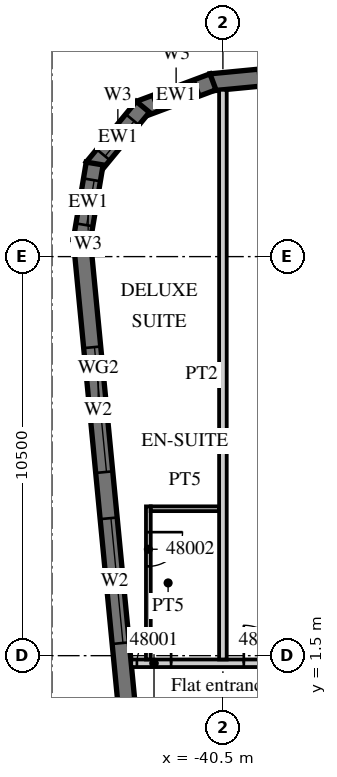
"""IFC4 building model, lengths in metres.
Left out: names, types, materials, properties, quantities, classifications, styles, units other than length and angle.
Written with IfcOpenShell. Run it as: python <this file> out.ifc"""

import sys

from ifc_helpers import new_model, si_unit, direction, frame, frame_2d, origin, place, context, subcontext, project, spatial, polyline, rectangle, outline, extrude, element, fill, save


model = new_model("IFC4")
c1 = context("Model", 3, precision=1e-05, world=origin(), true_north=direction((0.0, 1.0)))
c2 = subcontext(c1, "Body", "Model", "MODEL_VIEW")
j1 = project(units=[si_unit("LENGTHUNIT", "METRE"), si_unit("PLANEANGLEUNIT", "RADIAN")], contexts=[c1])
p1 = place(None, origin())
s1 = spatial("IfcSite", under=j1, at=p1, CompositionType="ELEMENT")
p2 = place(p1, origin())
s2 = spatial("IfcBuilding", under=s1, at=p2, CompositionType="ELEMENT")
p3 = place(p2, frame((0.0, 0.0, 199.9)))
s3 = spatial("IfcBuildingStorey", under=s2, at=p3, CompositionType="ELEMENT", Elevation=199.9)
p4 = place(p3, frame((-44.214, 12.466, 0.0), z_axis=(0.0, 0.0, 1.0), x_axis=(0.095847314626, -0.995396047952, 0.0)))
e1 = element("IfcWall", 1, at=p4, inside=s3, PredefinedType="SOLIDWALL", context=c2, shape_type="SweptSolid", body=[
    extrude(rectangle(XDim=34.0, YDim=0.45, at=frame_2d((17.0, 0.0))), origin(), (0.0, 0.0, 1.0), 3.02),
])
p5 = place(p4, frame((2.865, 0.0, 0.45)))
e2 = element("IfcOpeningElement", 2, at=p5, cuts=e1, PredefinedType="OPENING", context=c2, shape_type="SweptSolid", body=[
    extrude(rectangle(XDim=3.3, YDim=2.25, at=frame_2d((1.65, 1.125))), frame((0.0, 0.235, 0.0), z_axis=(0.0, -1.0, 0.0), x_axis=(1.0, 0.0, 0.0)), (0.0, 0.0, 1.0), 0.47),
])
p6 = place(p4, frame((7.386, 0.0, 0.45)))
e3 = element("IfcOpeningElement", 3, at=p6, cuts=e1, PredefinedType="OPENING", context=c2, shape_type="SweptSolid", body=[
    extrude(rectangle(XDim=3.3, YDim=2.25, at=frame_2d((1.65, 1.125))), frame((0.0, 0.235, 0.0), z_axis=(0.0, -1.0, 0.0), x_axis=(1.0, 0.0, 0.0)), (0.0, 0.0, 1.0), 0.47),
])
p7 = place(p3, frame((13.521, 21.817, 0.0), z_axis=(0.0, 0.0, 1.0), x_axis=(-0.995396508751, -0.095842529008, 0.0)))
e4 = element("IfcWall", 4, at=p7, inside=s3, PredefinedType="SOLIDWALL", context=c2, shape_type="SweptSolid", body=[
    extrude(rectangle(XDim=54.591, YDim=0.45, at=frame_2d((27.296, 0.0))), origin(), (0.0, 0.0, 1.0), 3.02),
])
p8 = place(p7, frame((0.91, 0.0, 0.45)))
e5 = element("IfcOpeningElement", 5, at=p8, cuts=e4, PredefinedType="OPENING", context=c2, shape_type="SweptSolid", body=[
    extrude(rectangle(XDim=2.7, YDim=2.25, at=frame_2d((1.35, 1.125))), frame((0.0, 0.235, 0.0), z_axis=(0.0, -1.0, 0.0), x_axis=(1.0, 0.0, 0.0)), (0.0, 0.0, 1.0), 0.47),
])
p9 = place(p7, frame((5.431, 0.0, 0.45)))
e6 = element("IfcOpeningElement", 6, at=p9, cuts=e4, PredefinedType="OPENING", context=c2, shape_type="SweptSolid", body=[
    extrude(rectangle(XDim=2.7, YDim=2.25, at=frame_2d((1.35, 1.125))), frame((0.0, 0.235, 0.0), z_axis=(0.0, -1.0, 0.0), x_axis=(1.0, 0.0, 0.0)), (0.0, 0.0, 1.0), 0.47),
])
p10 = place(p7, frame((9.952, 0.0, 0.45)))
e7 = element("IfcOpeningElement", 7, at=p10, cuts=e4, PredefinedType="OPENING", context=c2, shape_type="SweptSolid", body=[
    extrude(rectangle(XDim=2.7, YDim=2.25, at=frame_2d((1.35, 1.125))), frame((0.0, 0.235, 0.0), z_axis=(0.0, -1.0, 0.0), x_axis=(1.0, 0.0, 0.0)), (0.0, 0.0, 1.0), 0.47),
])
p11 = place(p7, frame((14.473, 0.0, 0.45)))
e8 = element("IfcOpeningElement", 8, at=p11, cuts=e4, PredefinedType="OPENING", context=c2, shape_type="SweptSolid", body=[
    extrude(rectangle(XDim=2.7, YDim=2.25, at=frame_2d((1.35, 1.125))), frame((0.0, 0.235, 0.0), z_axis=(0.0, -1.0, 0.0), x_axis=(1.0, 0.0, 0.0)), (0.0, 0.0, 1.0), 0.47),
])
p12 = place(p7, frame((18.994, 0.0, 0.45)))
e9 = element("IfcOpeningElement", 9, at=p12, cuts=e4, PredefinedType="OPENING", context=c2, shape_type="SweptSolid", body=[
    extrude(rectangle(XDim=2.7, YDim=2.25, at=frame_2d((1.35, 1.125))), frame((0.0, 0.235, 0.0), z_axis=(0.0, -1.0, 0.0), x_axis=(1.0, 0.0, 0.0)), (0.0, 0.0, 1.0), 0.47),
])
p13 = place(p7, frame((23.514, 0.0, 0.45)))
e10 = element("IfcOpeningElement", 10, at=p13, cuts=e4, PredefinedType="OPENING", context=c2, shape_type="SweptSolid", body=[
    extrude(rectangle(XDim=2.7, YDim=2.25, at=frame_2d((1.35, 1.125))), frame((0.0, 0.235, 0.0), z_axis=(0.0, -1.0, 0.0), x_axis=(1.0, 0.0, 0.0)), (0.0, 0.0, 1.0), 0.47),
])
p14 = place(p7, frame((28.035, 0.0, 0.45)))
e11 = element("IfcOpeningElement", 11, at=p14, cuts=e4, PredefinedType="OPENING", context=c2, shape_type="SweptSolid", body=[
    extrude(rectangle(XDim=2.7, YDim=2.25, at=frame_2d((1.35, 1.125))), frame((0.0, 0.235, 0.0), z_axis=(0.0, -1.0, 0.0), x_axis=(1.0, 0.0, 0.0)), (0.0, 0.0, 1.0), 0.47),
])
p15 = place(p7, frame((32.556, 0.0, 0.45)))
e12 = element("IfcOpeningElement", 12, at=p15, cuts=e4, PredefinedType="OPENING", context=c2, shape_type="SweptSolid", body=[
    extrude(rectangle(XDim=2.7, YDim=2.25, at=frame_2d((1.35, 1.125))), frame((0.0, 0.235, 0.0), z_axis=(0.0, -1.0, 0.0), x_axis=(1.0, 0.0, 0.0)), (0.0, 0.0, 1.0), 0.47),
])
p16 = place(p7, frame((37.077, 0.0, 0.45)))
e13 = element("IfcOpeningElement", 13, at=p16, cuts=e4, PredefinedType="OPENING", context=c2, shape_type="SweptSolid", body=[
    extrude(rectangle(XDim=2.7, YDim=2.25, at=frame_2d((1.35, 1.125))), frame((0.0, 0.235, 0.0), z_axis=(0.0, -1.0, 0.0), x_axis=(1.0, 0.0, 0.0)), (0.0, 0.0, 1.0), 0.47),
])
p17 = place(p7, frame((41.598, 0.0, 0.45)))
e14 = element("IfcOpeningElement", 14, at=p17, cuts=e4, PredefinedType="OPENING", context=c2, shape_type="SweptSolid", body=[
    extrude(rectangle(XDim=2.7, YDim=2.25, at=frame_2d((1.35, 1.125))), frame((0.0, 0.235, 0.0), z_axis=(0.0, -1.0, 0.0), x_axis=(1.0, 0.0, 0.0)), (0.0, 0.0, 1.0), 0.47),
])
p18 = place(p7, frame((46.118, 0.0, 0.45)))
e15 = element("IfcOpeningElement", 15, at=p18, cuts=e4, PredefinedType="OPENING", context=c2, shape_type="SweptSolid", body=[
    extrude(rectangle(XDim=2.7, YDim=2.25, at=frame_2d((1.35, 1.125))), frame((0.0, 0.235, 0.0), z_axis=(0.0, -1.0, 0.0), x_axis=(1.0, 0.0, 0.0)), (0.0, 0.0, 1.0), 0.47),
])
p19 = place(p7, frame((50.629, 0.0, 0.45)))
e16 = element("IfcOpeningElement", 16, at=p19, cuts=e4, PredefinedType="OPENING", context=c2, shape_type="SweptSolid", body=[
    extrude(rectangle(XDim=2.7, YDim=2.25, at=frame_2d((1.35, 1.125))), frame((0.0, 0.235, 0.0), z_axis=(0.0, -1.0, 0.0), x_axis=(1.0, 0.0, 0.0)), (0.0, 0.0, 1.0), 0.47),
])
p20 = place(p3, frame((-40.761, 16.598, 0.0), z_axis=(0.0, 0.0, 1.0), x_axis=(-0.936677599948, -0.350192909346, 0.0)))
e17 = element("IfcWall", 17, at=p20, inside=s3, PredefinedType="SOLIDWALL", context=c2, shape_type="SweptSolid", body=[
    extrude(outline(polyline([(0.0, -0.225), (2.071, -0.225), (1.95, 0.225), (0.121, 0.225), (0.0, -0.225)])), origin(), (0.0, 0.0, 1.0), 3.02),
])
p21 = place(p20, frame((0.435, 0.0, 0.45)))
e18 = element("IfcOpeningElement", 18, at=p21, cuts=e17, PredefinedType="OPENING", context=c2, shape_type="SweptSolid", body=[
    extrude(rectangle(XDim=1.2, YDim=2.25, at=frame_2d((0.6, 1.125))), frame((0.0, 0.235, 0.0), z_axis=(0.0, -1.0, 0.0), x_axis=(1.0, 0.0, 0.0)), (0.0, 0.0, 1.0), 0.47),
])
p22 = place(p3, frame((-42.606, 15.941, 0.0), z_axis=(0.0, 0.0, 1.0), x_axis=(-0.636116318187, -0.771593176315, 0.0)))
e19 = element("IfcWall", 19, at=p22, inside=s3, PredefinedType="SOLIDWALL", context=c2, shape_type="SweptSolid", body=[
    extrude(outline(polyline([(0.0, -0.225), (2.071, -0.225), (1.95, 0.225), (0.121, 0.225), (0.0, -0.225)])), origin(), (0.0, 0.0, 1.0), 3.02),
])
p23 = place(p22, frame((0.435, 0.0, 0.45)))
e20 = element("IfcOpeningElement", 20, at=p23, cuts=e19, PredefinedType="OPENING", context=c2, shape_type="SweptSolid", body=[
    extrude(rectangle(XDim=1.2, YDim=2.25, at=frame_2d((0.6, 1.125))), frame((0.0, 0.235, 0.0), z_axis=(0.0, -1.0, 0.0), x_axis=(1.0, 0.0, 0.0)), (0.0, 0.0, 1.0), 0.47),
])
p24 = place(p3, frame((-43.875, 14.449, 0.0), z_axis=(0.0, 0.0, 1.0), x_axis=(-0.164953448126, -0.986301353518, 0.0)))
e21 = element("IfcWall", 21, at=p24, inside=s3, PredefinedType="SOLIDWALL", context=c2, shape_type="SweptSolid", body=[
    extrude(outline(polyline([(0.0, -0.225), (2.071, -0.225), (1.95, 0.225), (0.121, 0.225), (0.0, -0.225)])), origin(), (0.0, 0.0, 1.0), 3.02),
])
p25 = place(p24, frame((0.435, 0.0, 0.45)))
e22 = element("IfcOpeningElement", 22, at=p25, cuts=e21, PredefinedType="OPENING", context=c2, shape_type="SweptSolid", body=[
    extrude(rectangle(XDim=1.2, YDim=2.25, at=frame_2d((0.6, 1.125))), frame((0.0, 0.235, 0.0), z_axis=(0.0, -1.0, 0.0), x_axis=(1.0, 0.0, 0.0)), (0.0, 0.0, 1.0), 0.47),
])
p26 = place(p3, frame((-42.913, 1.3, 0.0), z_axis=(0.0, 0.0, 1.0), x_axis=(1.0, 0.0, 0.0)))
e23 = element("IfcWall", 23, at=p26, inside=s3, PredefinedType="PARTITIONING", context=c2, shape_type="SweptSolid", body=[
    extrude(rectangle(XDim=29.413, YDim=0.2, at=frame_2d((14.707, 0.0))), origin(), (0.0, 0.0, 1.0), 3.02),
])
p27 = place(p26, frame((0.15, 0.0, 0.0)))
e24 = element("IfcOpeningElement", 24, at=p27, cuts=e23, PredefinedType="OPENING", context=c2, shape_type="SweptSolid", body=[
    extrude(rectangle(XDim=0.9, YDim=2.1, at=frame_2d((0.45, 1.05))), frame((0.0, 0.11, 0.0), z_axis=(0.0, -1.0, 0.0), x_axis=(1.0, 0.0, 0.0)), (0.0, 0.0, 1.0), 0.22),
])
p28 = place(p26, frame((2.963, 0.0, 0.0)))
e25 = element("IfcOpeningElement", 25, at=p28, cuts=e23, PredefinedType="OPENING", context=c2, shape_type="SweptSolid", body=[
    extrude(rectangle(XDim=1.0, YDim=2.1, at=frame_2d((0.5, 1.05))), frame((0.0, 0.11, 0.0), z_axis=(0.0, -1.0, 0.0), x_axis=(1.0, 0.0, 0.0)), (0.0, 0.0, 1.0), 0.22),
])
p29 = place(p26, frame((9.863, 0.0, 0.0)))
e26 = element("IfcOpeningElement", 26, at=p29, cuts=e23, PredefinedType="OPENING", context=c2, shape_type="SweptSolid", body=[
    extrude(rectangle(XDim=1.0, YDim=2.1, at=frame_2d((0.5, 1.05))), frame((0.0, 0.11, 0.0), z_axis=(0.0, -1.0, 0.0), x_axis=(1.0, 0.0, 0.0)), (0.0, 0.0, 1.0), 0.22),
])
p30 = place(p26, frame((14.338, 0.0, 0.0)))
e27 = element("IfcOpeningElement", 27, at=p30, cuts=e23, PredefinedType="OPENING", context=c2, shape_type="SweptSolid", body=[
    extrude(rectangle(XDim=1.0, YDim=2.1, at=frame_2d((0.5, 1.05))), frame((0.0, 0.11, 0.0), z_axis=(0.0, -1.0, 0.0), x_axis=(1.0, 0.0, 0.0)), (0.0, 0.0, 1.0), 0.22),
])
p31 = place(p26, frame((21.275, 0.0, 0.0)))
e28 = element("IfcOpeningElement", 28, at=p31, cuts=e23, PredefinedType="OPENING", context=c2, shape_type="SweptSolid", body=[
    extrude(rectangle(XDim=1.2, YDim=2.1, at=frame_2d((0.6, 1.05))), frame((0.0, 0.11, 0.0), z_axis=(0.0, -1.0, 0.0), x_axis=(1.0, 0.0, 0.0)), (0.0, 0.0, 1.0), 0.22),
])
p32 = place(p26, frame((25.488, 0.0, 0.0)))
e29 = element("IfcOpeningElement", 29, at=p32, cuts=e23, PredefinedType="OPENING", context=c2, shape_type="SweptSolid", body=[
    extrude(rectangle(XDim=1.0, YDim=2.1, at=frame_2d((0.5, 1.05))), frame((0.0, 0.11, 0.0), z_axis=(0.0, -1.0, 0.0), x_axis=(1.0, 0.0, 0.0)), (0.0, 0.0, 1.0), 0.22),
])
p33 = place(p3, frame((-40.5, 1.4, 0.0), z_axis=(0.0, 0.0, 1.0), x_axis=(0.0, 1.0, 0.0)))
e30 = element("IfcWall", 30, at=p33, inside=s3, PredefinedType="PARTITIONING", context=c2, shape_type="SweptSolid", body=[
    extrude(rectangle(XDim=14.99, YDim=0.2, at=frame_2d((7.495, 0.0))), origin(), (0.0, 0.0, 1.0), 3.02),
])
p34 = place(p3, frame((-42.462, 1.4, 0.0), z_axis=(0.0, 0.0, 1.0), x_axis=(0.0, 1.0, 0.0)))
e31 = element("IfcWall", 31, at=p34, inside=s3, PredefinedType="PARTITIONING", context=c2, shape_type="SweptSolid", body=[
    extrude(rectangle(XDim=4.028, YDim=0.125, at=frame_2d((2.014, 0.0))), origin(), (0.0, 0.0, 1.0), 3.02),
])
p35 = place(p34, frame((2.45, 0.0, 0.0)))
e32 = element("IfcOpeningElement", 32, at=p35, cuts=e31, PredefinedType="OPENING", context=c2, shape_type="SweptSolid", body=[
    extrude(rectangle(XDim=0.9, YDim=2.1, at=frame_2d((0.45, 1.05))), frame((0.0, 0.073, 0.0), z_axis=(0.0, -1.0, 0.0), x_axis=(1.0, 0.0, 0.0)), (0.0, 0.0, 1.0), 0.145),
])
p36 = place(p3, frame((-42.4, 5.366, 0.0), z_axis=(0.0, 0.0, 1.0), x_axis=(1.0, 0.0, 0.0)))
e33 = element("IfcWall", 33, at=p36, inside=s3, PredefinedType="PARTITIONING", context=c2, shape_type="SweptSolid", body=[
    extrude(rectangle(XDim=1.8, YDim=0.125, at=frame_2d((0.9, 0.0))), origin(), (0.0, 0.0, 1.0), 3.02),
])
p37 = place(p5, origin())
e34 = element("IfcWindow", 34, at=p37, inside=s3, PartitioningType="SINGLE_PANEL", PredefinedType="WINDOW", context=c2, shape_type="SweptSolid", body=[
    extrude(rectangle(XDim=3.3, YDim=2.25, at=frame_2d((1.65, 1.125))), frame((0.0, 0.09, 0.0), z_axis=(0.0, -1.0, 0.0), x_axis=(1.0, 0.0, 0.0)), (0.0, 0.0, 1.0), 0.06),
])
fill(e2, e34)
p38 = place(p6, origin())
e35 = element("IfcWindow", 35, at=p38, inside=s3, PartitioningType="SINGLE_PANEL", PredefinedType="WINDOW", context=c2, shape_type="SweptSolid", body=[
    extrude(rectangle(XDim=3.3, YDim=2.25, at=frame_2d((1.65, 1.125))), frame((0.0, 0.09, 0.0), z_axis=(0.0, -1.0, 0.0), x_axis=(1.0, 0.0, 0.0)), (0.0, 0.0, 1.0), 0.06),
])
fill(e3, e35)
p39 = place(p21, origin())
e36 = element("IfcWindow", 36, at=p39, inside=s3, PartitioningType="SINGLE_PANEL", PredefinedType="WINDOW", context=c2, shape_type="SweptSolid", body=[
    extrude(rectangle(XDim=1.2, YDim=2.25, at=frame_2d((0.6, 1.125))), frame((0.0, 0.09, 0.0), z_axis=(0.0, -1.0, 0.0), x_axis=(1.0, 0.0, 0.0)), (0.0, 0.0, 1.0), 0.06),
])
fill(e18, e36)
p40 = place(p23, origin())
e37 = element("IfcWindow", 37, at=p40, inside=s3, PartitioningType="SINGLE_PANEL", PredefinedType="WINDOW", context=c2, shape_type="SweptSolid", body=[
    extrude(rectangle(XDim=1.2, YDim=2.25, at=frame_2d((0.6, 1.125))), frame((0.0, 0.09, 0.0), z_axis=(0.0, -1.0, 0.0), x_axis=(1.0, 0.0, 0.0)), (0.0, 0.0, 1.0), 0.06),
])
fill(e20, e37)
p41 = place(p25, origin())
e38 = element("IfcWindow", 38, at=p41, inside=s3, PartitioningType="SINGLE_PANEL", PredefinedType="WINDOW", context=c2, shape_type="SweptSolid", body=[
    extrude(rectangle(XDim=1.2, YDim=2.25, at=frame_2d((0.6, 1.125))), frame((0.0, 0.09, 0.0), z_axis=(0.0, -1.0, 0.0), x_axis=(1.0, 0.0, 0.0)), (0.0, 0.0, 1.0), 0.06),
])
fill(e22, e38)
p42 = place(p27, origin())
e39 = element("IfcDoor", 39, at=p42, inside=s3, OperationType="SINGLE_SWING_RIGHT", PredefinedType="DOOR", context=c2, shape_type="SweptSolid", body=[
    extrude(rectangle(XDim=0.9, YDim=2.1, at=frame_2d((0.45, 1.05))), frame((0.0, 0.025, 0.0), z_axis=(0.0, -1.0, 0.0), x_axis=(1.0, 0.0, 0.0)), (0.0, 0.0, 1.0), 0.05),
])
fill(e24, e39)
p43 = place(p35, origin())
e40 = element("IfcDoor", 40, at=p43, inside=s3, OperationType="SINGLE_SWING_RIGHT", PredefinedType="DOOR", context=c2, shape_type="SweptSolid", body=[
    extrude(rectangle(XDim=0.9, YDim=2.1, at=frame_2d((0.45, 1.05))), frame((0.0, 0.025, 0.0), z_axis=(0.0, -1.0, 0.0), x_axis=(1.0, 0.0, 0.0)), (0.0, 0.0, 1.0), 0.05),
])
fill(e32, e40)
p44 = place(p28, origin())
e41 = element("IfcDoor", 41, at=p44, inside=s3, OperationType="SINGLE_SWING_LEFT", PredefinedType="DOOR", context=c2, shape_type="SweptSolid", body=[
    extrude(rectangle(XDim=1.0, YDim=2.1, at=frame_2d((0.5, 1.05))), frame((0.0, 0.025, 0.0), z_axis=(0.0, -1.0, 0.0), x_axis=(1.0, 0.0, 0.0)), (0.0, 0.0, 1.0), 0.05),
])
fill(e25, e41)
save(model, sys.argv[1])
